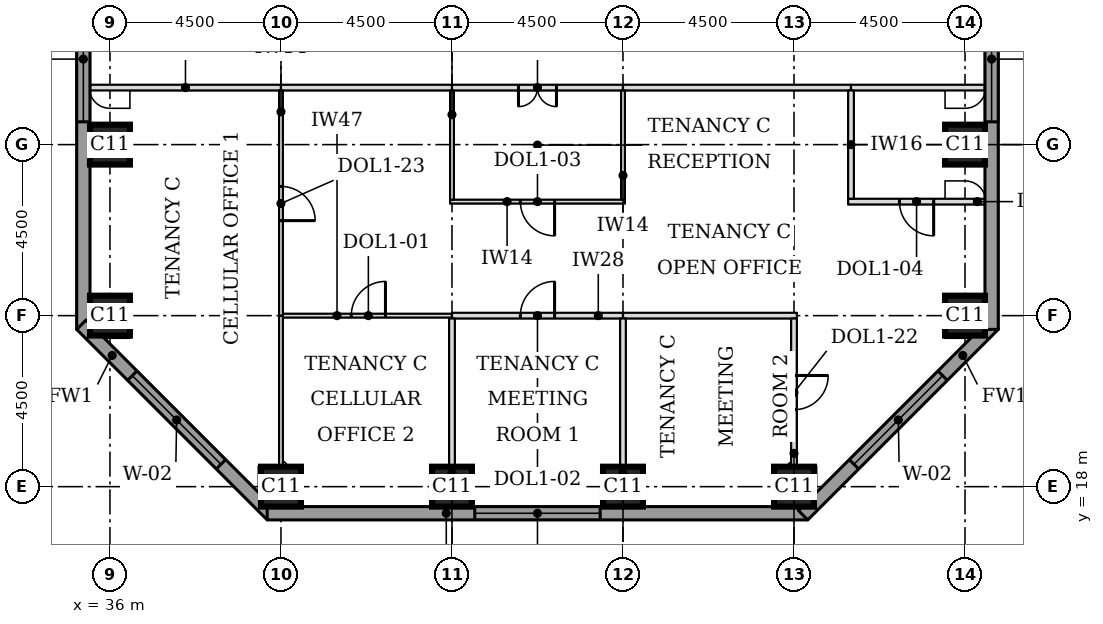
"""IFC4 building model, lengths in metres.
Left out: names, types, materials, properties, quantities, classifications, styles, units other than length and angle.
Written with IfcOpenShell. Run it as: python <this file> out.ifc"""

import sys

from ifc_helpers import new_model, si_unit, direction, frame, frame_2d, origin, origin_2d, place, context, subcontext, project, spatial, rectangle, extrude, element, fill, save


model = new_model("IFC4")
c1 = context("Model", 3, precision=1e-05, world=origin(), true_north=direction((0.0, 1.0)))
c2 = subcontext(c1, "Body", "Model", "MODEL_VIEW")
j1 = project(units=[si_unit("LENGTHUNIT", "METRE"), si_unit("PLANEANGLEUNIT", "RADIAN")], contexts=[c1])
p1 = place(None, origin())
s1 = spatial("IfcSite", under=j1, at=p1, CompositionType="ELEMENT")
p2 = place(p1, origin())
s2 = spatial("IfcBuilding", under=s1, at=p2, CompositionType="ELEMENT")
p3 = place(p2, frame((0.0, 0.0, 82.6)))
s3 = spatial("IfcBuildingStorey", under=s2, at=p3, CompositionType="ELEMENT", Elevation=82.6)
for number, where, z_axis, x_axis in (
    (1, (40.5, 18.0, 0.0), (0.0, 0.0, 1.0), (1.0, 0.0, 0.0)),
    (2, (45.0, 18.0, 0.0), (0.0, 0.0, 1.0), (1.0, 0.0, 0.0)),
    (3, (49.5, 18.0, 0.0), (0.0, 0.0, 1.0), (1.0, 0.0, 0.0)),
    (4, (54.0, 18.0, 0.0), (0.0, 0.0, 1.0), (1.0, 0.0, 0.0)),
    (5, (36.0, 22.5, 0.0), (0.0, 0.0, 1.0), (1.0, 0.0, 0.0)),
    (6, (58.5, 22.5, 0.0), (0.0, 0.0, 1.0), (1.0, 0.0, 0.0)),
    (7, (36.0, 27.0, 0.0), (0.0, 0.0, 1.0), (1.0, 0.0, 0.0)),
    (8, (58.5, 27.0, 0.0), (0.0, 0.0, 1.0), (1.0, 0.0, 0.0)),
):
    element("IfcColumn", number, at=place(p3, frame(where, z_axis=z_axis, x_axis=x_axis)), inside=s3, PredefinedType="COLUMN", context=c2, shape_type="SweptSolid", body=[
        extrude(rectangle(XDim=1.05, YDim=1.05, at=origin_2d()), origin(), (0.0, 0.0, 1.0), 3.7),
    ])
p4 = place(p3, frame((35.3, 39.975, 0.0), z_axis=(0.0, 0.0, 1.0), x_axis=(0.0, -1.0, 0.0)))
e9 = element("IfcWall", 9, at=p4, inside=s3, PredefinedType="STANDARD", context=c2, shape_type="SweptSolid", body=[
    extrude(rectangle(XDim=17.837, YDim=0.35, at=frame_2d((8.919, 0.0))), origin(), (0.0, 0.0, 1.0), 3.525),
])
p5 = place(p4, frame((0.5, 0.0, 0.9)))
e10 = element("IfcOpeningElement", 10, at=p5, cuts=e9, PredefinedType="OPENING", context=c2, shape_type="SweptSolid", body=[
    extrude(rectangle(XDim=3.3, YDim=1.9, at=frame_2d((1.65, 0.95))), frame((0.0, 0.185, 0.0), z_axis=(0.0, -1.0, 0.0), x_axis=(1.0, 0.0, 0.0)), (0.0, 0.0, 1.0), 0.37),
])
p6 = place(p4, frame((9.075, 0.0, 0.9)))
e11 = element("IfcOpeningElement", 11, at=p6, cuts=e9, PredefinedType="OPENING", context=c2, shape_type="SweptSolid", body=[
    extrude(rectangle(XDim=3.3, YDim=1.9, at=frame_2d((1.65, 0.95))), frame((0.0, 0.185, 0.0), z_axis=(0.0, -1.0, 0.0), x_axis=(1.0, 0.0, 0.0)), (0.0, 0.0, 1.0), 0.37),
])
p7 = place(p3, frame((35.249, 22.261, 0.0), z_axis=(0.0, 0.0, 1.0), x_axis=(0.707106781187, -0.707106781187, 0.0)))
e12 = element("IfcWall", 12, at=p7, inside=s3, PredefinedType="STANDARD", context=c2, shape_type="SweptSolid", body=[
    extrude(rectangle(XDim=7.089, YDim=0.35, at=frame_2d((3.544, 0.0))), origin(), (0.0, 0.0, 1.0), 3.525),
])
p8 = place(p7, frame((1.894, 0.0, 0.9)))
e13 = element("IfcOpeningElement", 13, at=p8, cuts=e12, PredefinedType="OPENING", context=c2, shape_type="SweptSolid", body=[
    extrude(rectangle(XDim=3.3, YDim=1.9, at=frame_2d((1.65, 0.95))), frame((0.0, 0.185, 0.0), z_axis=(0.0, -1.0, 0.0), x_axis=(1.0, 0.0, 0.0)), (0.0, 0.0, 1.0), 0.37),
])
p9 = place(p3, frame((40.138, 17.3, 0.0), z_axis=(0.0, 0.0, 1.0), x_axis=(1.0, 0.0, 0.0)))
e14 = element("IfcWall", 14, at=p9, inside=s3, PredefinedType="STANDARD", context=c2, shape_type="SweptSolid", body=[
    extrude(rectangle(XDim=14.225, YDim=0.35, at=frame_2d((7.112, 0.0))), origin(), (0.0, 0.0, 1.0), 3.525),
])
p10 = place(p9, frame((5.462, 0.0, 0.9)))
e15 = element("IfcOpeningElement", 15, at=p10, cuts=e14, PredefinedType="OPENING", context=c2, shape_type="SweptSolid", body=[
    extrude(rectangle(XDim=3.3, YDim=1.9, at=frame_2d((1.65, 0.95))), frame((0.0, 0.185, 0.0), z_axis=(0.0, -1.0, 0.0), x_axis=(1.0, 0.0, 0.0)), (0.0, 0.0, 1.0), 0.37),
])
p11 = place(p3, frame((54.239, 17.249, 0.0), z_axis=(0.0, 0.0, 1.0), x_axis=(0.707106781187, 0.707106781187, 0.0)))
e16 = element("IfcWall", 16, at=p11, inside=s3, PredefinedType="STANDARD", context=c2, shape_type="SweptSolid", body=[
    extrude(rectangle(XDim=7.089, YDim=0.35, at=frame_2d((3.544, 0.0))), origin(), (0.0, 0.0, 1.0), 3.525),
])
p12 = place(p11, frame((1.894, 0.0, 0.9)))
e17 = element("IfcOpeningElement", 17, at=p12, cuts=e16, PredefinedType="OPENING", context=c2, shape_type="SweptSolid", body=[
    extrude(rectangle(XDim=3.3, YDim=1.9, at=frame_2d((1.65, 0.95))), frame((0.0, 0.185, 0.0), z_axis=(0.0, -1.0, 0.0), x_axis=(1.0, 0.0, 0.0)), (0.0, 0.0, 1.0), 0.37),
])
p13 = place(p3, frame((59.2, 22.138, 0.0), z_axis=(0.0, 0.0, 1.0), x_axis=(0.0, 1.0, 0.0)))
e18 = element("IfcWall", 18, at=p13, inside=s3, PredefinedType="STANDARD", context=c2, shape_type="SweptSolid", body=[
    extrude(rectangle(XDim=17.837, YDim=0.35, at=frame_2d((8.919, 0.0))), origin(), (0.0, 0.0, 1.0), 3.525),
])
p14 = place(p13, frame((5.462, 0.0, 0.9)))
e19 = element("IfcOpeningElement", 19, at=p14, cuts=e18, PredefinedType="OPENING", context=c2, shape_type="SweptSolid", body=[
    extrude(rectangle(XDim=3.3, YDim=1.9, at=frame_2d((1.65, 0.95))), frame((0.0, 0.185, 0.0), z_axis=(0.0, -1.0, 0.0), x_axis=(1.0, 0.0, 0.0)), (0.0, 0.0, 1.0), 0.37),
])
p15 = place(p13, frame((14.037, 0.0, 0.9)))
e20 = element("IfcOpeningElement", 20, at=p15, cuts=e18, PredefinedType="OPENING", context=c2, shape_type="SweptSolid", body=[
    extrude(rectangle(XDim=3.3, YDim=1.9, at=frame_2d((1.65, 0.95))), frame((0.0, 0.185, 0.0), z_axis=(0.0, -1.0, 0.0), x_axis=(1.0, 0.0, 0.0)), (0.0, 0.0, 1.0), 0.37),
])
p16 = place(p3, frame((40.55, 22.5, 0.0), z_axis=(0.0, 0.0, 1.0), x_axis=(1.0, 0.0, 0.0)))
e21 = element("IfcWall", 21, at=p16, inside=s3, PredefinedType="PARTITIONING", context=c2, shape_type="SweptSolid", body=[
    extrude(rectangle(XDim=4.45, YDim=0.1, at=frame_2d((2.225, 0.0))), origin(), (0.0, 0.0, 1.0), 2.55),
])
p17 = place(p16, frame((1.8, 0.0, 0.0)))
e22 = element("IfcOpeningElement", 22, at=p17, cuts=e21, PredefinedType="OPENING", context=c2, shape_type="SweptSolid", body=[
    extrude(rectangle(XDim=0.9, YDim=2.1, at=frame_2d((0.45, 1.05))), frame((0.0, 0.06, 0.0), z_axis=(0.0, -1.0, 0.0), x_axis=(1.0, 0.0, 0.0)), (0.0, 0.0, 1.0), 0.12),
])
p18 = place(p3, frame((45.0, 22.5, 0.0), z_axis=(0.0, 0.0, 1.0), x_axis=(1.0, 0.0, 0.0)))
e23 = element("IfcWall", 23, at=p18, inside=s3, PredefinedType="PARTITIONING", context=c2, shape_type="SweptSolid", body=[
    extrude(rectangle(XDim=4.5, YDim=0.15, at=frame_2d((2.25, 0.0))), origin(), (0.0, 0.0, 1.0), 2.55),
])
p19 = place(p18, frame((1.8, 0.0, 0.0)))
e24 = element("IfcOpeningElement", 24, at=p19, cuts=e23, PredefinedType="OPENING", context=c2, shape_type="SweptSolid", body=[
    extrude(rectangle(XDim=0.9, YDim=2.1, at=frame_2d((0.45, 1.05))), frame((0.0, 0.085, 0.0), z_axis=(0.0, -1.0, 0.0), x_axis=(1.0, 0.0, 0.0)), (0.0, 0.0, 1.0), 0.17),
])
p20 = place(p3, frame((49.5, 22.5, 0.0), z_axis=(0.0, 0.0, 1.0), x_axis=(1.0, 0.0, 0.0)))
e25 = element("IfcWall", 25, at=p20, inside=s3, PredefinedType="PARTITIONING", context=c2, shape_type="SweptSolid", body=[
    extrude(rectangle(XDim=4.575, YDim=0.15, at=frame_2d((2.288, 0.0))), origin(), (0.0, 0.0, 1.0), 2.55),
])
p21 = place(p3, frame((44.95, 25.5, 0.0), z_axis=(0.0, 0.0, 1.0), x_axis=(1.0, 0.0, 0.0)))
e26 = element("IfcWall", 26, at=p21, inside=s3, PredefinedType="PARTITIONING", context=c2, shape_type="SweptSolid", body=[
    extrude(rectangle(XDim=4.6, YDim=0.1, at=frame_2d((2.3, 0.0))), origin(), (0.0, 0.0, 1.0), 3.55),
])
p22 = place(p21, frame((1.85, 0.0, 0.0)))
e27 = element("IfcOpeningElement", 27, at=p22, cuts=e26, PredefinedType="OPENING", context=c2, shape_type="SweptSolid", body=[
    extrude(rectangle(XDim=0.9, YDim=2.1, at=frame_2d((0.45, 1.05))), frame((0.0, 0.06, 0.0), z_axis=(0.0, -1.0, 0.0), x_axis=(1.0, 0.0, 0.0)), (0.0, 0.0, 1.0), 0.12),
])
p23 = place(p3, frame((55.425, 25.5, 0.0), z_axis=(0.0, 0.0, 1.0), x_axis=(1.0, 0.0, 0.0)))
e28 = element("IfcWall", 28, at=p23, inside=s3, PredefinedType="PARTITIONING", context=c2, shape_type="SweptSolid", body=[
    extrude(rectangle(XDim=3.6, YDim=0.15, at=frame_2d((1.8, 0.0))), origin(), (0.0, 0.0, 1.0), 3.55),
])
p24 = place(p23, frame((1.35, 0.0, 0.0)))
e29 = element("IfcOpeningElement", 29, at=p24, cuts=e28, PredefinedType="OPENING", context=c2, shape_type="SweptSolid", body=[
    extrude(rectangle(XDim=0.9, YDim=2.1, at=frame_2d((0.45, 1.05))), frame((0.0, 0.085, 0.0), z_axis=(0.0, -1.0, 0.0), x_axis=(1.0, 0.0, 0.0)), (0.0, 0.0, 1.0), 0.17),
])
p25 = place(p3, frame((35.475, 28.5, 0.0), z_axis=(0.0, 0.0, 1.0), x_axis=(1.0, 0.0, 0.0)))
e30 = element("IfcWall", 30, at=p25, inside=s3, PredefinedType="PARTITIONING", context=c2, shape_type="SweptSolid", body=[
    extrude(rectangle(XDim=5.025, YDim=0.15, at=frame_2d((2.512, 0.0))), origin(), (0.0, 0.0, 1.0), 3.55),
])
p26 = place(p3, frame((40.5, 28.5, 0.0), z_axis=(0.0, 0.0, 1.0), x_axis=(1.0, 0.0, 0.0)))
e31 = element("IfcWall", 31, at=p26, inside=s3, PredefinedType="PARTITIONING", context=c2, shape_type="SweptSolid", body=[
    extrude(rectangle(XDim=4.5, YDim=0.15, at=frame_2d((2.25, 0.0))), origin(), (0.0, 0.0, 1.0), 3.55),
])
p27 = place(p3, frame((45.0, 28.5, 0.0), z_axis=(0.0, 0.0, 1.0), x_axis=(1.0, 0.0, 0.0)))
e32 = element("IfcWall", 32, at=p27, inside=s3, PredefinedType="PARTITIONING", context=c2, shape_type="SweptSolid", body=[
    extrude(rectangle(XDim=4.5, YDim=0.15, at=frame_2d((2.25, 0.0))), origin(), (0.0, 0.0, 1.0), 3.55),
])
p28 = place(p27, frame((1.75, 0.0, 0.0)))
e33 = element("IfcOpeningElement", 33, at=p28, cuts=e32, PredefinedType="OPENING", context=c2, shape_type="SweptSolid", body=[
    extrude(rectangle(XDim=1.0, YDim=2.1, at=frame_2d((0.5, 1.05))), frame((0.0, 0.085, 0.0), z_axis=(0.0, -1.0, 0.0), x_axis=(1.0, 0.0, 0.0)), (0.0, 0.0, 1.0), 0.17),
])
p29 = place(p3, frame((49.5, 28.5, 0.0), z_axis=(0.0, 0.0, 1.0), x_axis=(1.0, 0.0, 0.0)))
e34 = element("IfcWall", 34, at=p29, inside=s3, PredefinedType="PARTITIONING", context=c2, shape_type="SweptSolid", body=[
    extrude(rectangle(XDim=6.0, YDim=0.15, at=frame_2d((3.0, 0.0))), origin(), (0.0, 0.0, 1.0), 3.55),
])
p30 = place(p3, frame((55.5, 28.5, 0.0), z_axis=(0.0, 0.0, 1.0), x_axis=(1.0, 0.0, 0.0)))
e35 = element("IfcWall", 35, at=p30, inside=s3, PredefinedType="PARTITIONING", context=c2, shape_type="SweptSolid", body=[
    extrude(rectangle(XDim=3.525, YDim=0.15, at=frame_2d((1.762, 0.0))), origin(), (0.0, 0.0, 1.0), 3.55),
])
for number, where, z_axis, x_axis in (
    (36, (45.0, 17.475, 0.0), (0.0, 0.0, 1.0), (0.0, 1.0, 0.0)),
    (37, (49.5, 17.475, 0.0), (0.0, 0.0, 1.0), (0.0, 1.0, 0.0)),
):
    element("IfcWall", number, at=place(p3, frame(where, z_axis=z_axis, x_axis=x_axis)), inside=s3, PredefinedType="PARTITIONING", context=c2, shape_type="SweptSolid", body=[
        extrude(rectangle(XDim=4.95, YDim=0.15, at=frame_2d((2.475, 0.0))), origin(), (0.0, 0.0, 1.0), 3.55),
    ])
p31 = place(p3, frame((40.5, 18.525, 0.0), z_axis=(0.0, 0.0, 1.0), x_axis=(0.0, 1.0, 0.0)))
e38 = element("IfcWall", 38, at=p31, inside=s3, PredefinedType="PARTITIONING", context=c2, shape_type="SweptSolid", body=[
    extrude(rectangle(XDim=3.975, YDim=0.1, at=frame_2d((1.988, 0.0))), origin(), (0.0, 0.0, 1.0), 3.55),
])
p32 = place(p3, frame((54.0, 18.525, 0.0), z_axis=(0.0, 0.0, 1.0), x_axis=(0.0, 1.0, 0.0)))
e39 = element("IfcWall", 39, at=p32, inside=s3, PredefinedType="PARTITIONING", context=c2, shape_type="SweptSolid", body=[
    extrude(rectangle(XDim=3.9, YDim=0.15, at=frame_2d((1.95, 0.0))), origin(), (0.0, 0.0, 1.0), 3.55),
])
p33 = place(p32, frame((1.5, 0.0, 0.0)))
e40 = element("IfcOpeningElement", 40, at=p33, cuts=e39, PredefinedType="OPENING", context=c2, shape_type="SweptSolid", body=[
    extrude(rectangle(XDim=0.9, YDim=2.1, at=frame_2d((0.45, 1.05))), frame((0.0, 0.085, 0.0), z_axis=(0.0, -1.0, 0.0), x_axis=(1.0, 0.0, 0.0)), (0.0, 0.0, 1.0), 0.17),
])
p34 = place(p3, frame((40.5, 22.5, 0.0), z_axis=(0.0, 0.0, 1.0), x_axis=(0.0, 1.0, 0.0)))
e41 = element("IfcWall", 41, at=p34, inside=s3, PredefinedType="PARTITIONING", context=c2, shape_type="SweptSolid", body=[
    extrude(rectangle(XDim=5.925, YDim=0.1, at=frame_2d((2.962, 0.0))), origin(), (0.0, 0.0, 1.0), 3.55),
])
p35 = place(p34, frame((2.5, 0.0, 0.0)))
e42 = element("IfcOpeningElement", 42, at=p35, cuts=e41, PredefinedType="OPENING", context=c2, shape_type="SweptSolid", body=[
    extrude(rectangle(XDim=0.9, YDim=2.1, at=frame_2d((0.45, 1.05))), frame((0.0, 0.06, 0.0), z_axis=(0.0, -1.0, 0.0), x_axis=(1.0, 0.0, 0.0)), (0.0, 0.0, 1.0), 0.12),
])
for number, where, z_axis, x_axis in (
    (43, (45.0, 25.55, 0.0), (0.0, 0.0, 1.0), (0.0, 1.0, 0.0)),
    (44, (49.5, 25.55, 0.0), (0.0, 0.0, 1.0), (0.0, 1.0, 0.0)),
):
    element("IfcWall", number, at=place(p3, frame(where, z_axis=z_axis, x_axis=x_axis)), inside=s3, PredefinedType="PARTITIONING", context=c2, shape_type="SweptSolid", body=[
        extrude(rectangle(XDim=2.875, YDim=0.1, at=frame_2d((1.438, 0.0))), origin(), (0.0, 0.0, 1.0), 3.55),
    ])
p36 = place(p3, frame((55.5, 25.575, 0.0), z_axis=(0.0, 0.0, 1.0), x_axis=(0.0, 1.0, 0.0)))
e45 = element("IfcWall", 45, at=p36, inside=s3, PredefinedType="PARTITIONING", context=c2, shape_type="SweptSolid", body=[
    extrude(rectangle(XDim=2.85, YDim=0.15, at=frame_2d((1.425, 0.0))), origin(), (0.0, 0.0, 1.0), 3.55),
])
p37 = place(p6, origin())
e46 = element("IfcWindow", 46, at=p37, inside=s3, PartitioningType="SINGLE_PANEL", PredefinedType="WINDOW", context=c2, shape_type="SweptSolid", body=[
    extrude(rectangle(XDim=3.3, YDim=1.9, at=frame_2d((1.65, 0.95))), frame((0.0, 0.085, 0.0), z_axis=(0.0, -1.0, 0.0), x_axis=(1.0, 0.0, 0.0)), (0.0, 0.0, 1.0), 0.06),
])
fill(e11, e46)
p38 = place(p8, origin())
e47 = element("IfcWindow", 47, at=p38, inside=s3, PartitioningType="SINGLE_PANEL", PredefinedType="WINDOW", context=c2, shape_type="SweptSolid", body=[
    extrude(rectangle(XDim=3.3, YDim=1.9, at=frame_2d((1.65, 0.95))), frame((0.0, 0.085, 0.0), z_axis=(0.0, -1.0, 0.0), x_axis=(1.0, 0.0, 0.0)), (0.0, 0.0, 1.0), 0.06),
])
fill(e13, e47)
p39 = place(p10, origin())
e48 = element("IfcWindow", 48, at=p39, inside=s3, PartitioningType="SINGLE_PANEL", PredefinedType="WINDOW", context=c2, shape_type="SweptSolid", body=[
    extrude(rectangle(XDim=3.3, YDim=1.9, at=frame_2d((1.65, 0.95))), frame((0.0, 0.085, 0.0), z_axis=(0.0, -1.0, 0.0), x_axis=(1.0, 0.0, 0.0)), (0.0, 0.0, 1.0), 0.06),
])
fill(e15, e48)
p40 = place(p12, origin())
e49 = element("IfcWindow", 49, at=p40, inside=s3, PartitioningType="SINGLE_PANEL", PredefinedType="WINDOW", context=c2, shape_type="SweptSolid", body=[
    extrude(rectangle(XDim=3.3, YDim=1.9, at=frame_2d((1.65, 0.95))), frame((0.0, 0.085, 0.0), z_axis=(0.0, -1.0, 0.0), x_axis=(1.0, 0.0, 0.0)), (0.0, 0.0, 1.0), 0.06),
])
fill(e17, e49)
p41 = place(p14, origin())
e50 = element("IfcWindow", 50, at=p41, inside=s3, PartitioningType="SINGLE_PANEL", PredefinedType="WINDOW", context=c2, shape_type="SweptSolid", body=[
    extrude(rectangle(XDim=3.3, YDim=1.9, at=frame_2d((1.65, 0.95))), frame((0.0, 0.085, 0.0), z_axis=(0.0, -1.0, 0.0), x_axis=(1.0, 0.0, 0.0)), (0.0, 0.0, 1.0), 0.06),
])
fill(e19, e50)
p42 = place(p28, frame((1.0, 0.0, 0.0), z_axis=(0.0, 0.0, 1.0), x_axis=(-1.0, 0.0, 0.0)))
e51 = element("IfcDoor", 51, at=p42, inside=s3, OperationType="DOUBLE_DOOR_SINGLE_SWING", PredefinedType="DOOR", context=c2, shape_type="SweptSolid", body=[
    extrude(rectangle(XDim=1.0, YDim=2.1, at=frame_2d((0.5, 1.05))), frame((0.0, 0.025, 0.0), z_axis=(0.0, -1.0, 0.0), x_axis=(1.0, 0.0, 0.0)), (0.0, 0.0, 1.0), 0.05),
])
fill(e33, e51)
p43 = place(p22, frame((0.9, 0.0, 0.0), z_axis=(0.0, 0.0, 1.0), x_axis=(-1.0, 0.0, 0.0)))
e52 = element("IfcDoor", 52, at=p43, inside=s3, OperationType="SINGLE_SWING_LEFT", PredefinedType="DOOR", context=c2, shape_type="SweptSolid", body=[
    extrude(rectangle(XDim=0.9, YDim=2.1, at=frame_2d((0.45, 1.05))), frame((0.0, 0.025, 0.0), z_axis=(0.0, -1.0, 0.0), x_axis=(1.0, 0.0, 0.0)), (0.0, 0.0, 1.0), 0.05),
])
fill(e27, e52)
p44 = place(p35, frame((0.9, 0.0, 0.0), z_axis=(0.0, 0.0, 1.0), x_axis=(-1.0, 0.0, 0.0)))
e53 = element("IfcDoor", 53, at=p44, inside=s3, OperationType="SINGLE_SWING_RIGHT", PredefinedType="DOOR", context=c2, shape_type="SweptSolid", body=[
    extrude(rectangle(XDim=0.9, YDim=2.1, at=frame_2d((0.45, 1.05))), frame((0.0, 0.025, 0.0), z_axis=(0.0, -1.0, 0.0), x_axis=(1.0, 0.0, 0.0)), (0.0, 0.0, 1.0), 0.05),
])
fill(e42, e53)
p45 = place(p17, origin())
e54 = element("IfcDoor", 54, at=p45, inside=s3, OperationType="SINGLE_SWING_RIGHT", PredefinedType="DOOR", context=c2, shape_type="SweptSolid", body=[
    extrude(rectangle(XDim=0.9, YDim=2.1, at=frame_2d((0.45, 1.05))), frame((0.0, 0.025, 0.0), z_axis=(0.0, -1.0, 0.0), x_axis=(1.0, 0.0, 0.0)), (0.0, 0.0, 1.0), 0.05),
])
fill(e22, e54)
p46 = place(p24, frame((0.9, 0.0, 0.0), z_axis=(0.0, 0.0, 1.0), x_axis=(-1.0, 0.0, 0.0)))
e55 = element("IfcDoor", 55, at=p46, inside=s3, OperationType="SINGLE_SWING_LEFT", PredefinedType="DOOR", context=c2, shape_type="SweptSolid", body=[
    extrude(rectangle(XDim=0.9, YDim=2.1, at=frame_2d((0.45, 1.05))), frame((0.0, 0.025, 0.0), z_axis=(0.0, -1.0, 0.0), x_axis=(1.0, 0.0, 0.0)), (0.0, 0.0, 1.0), 0.05),
])
fill(e29, e55)
p47 = place(p19, origin())
e56 = element("IfcDoor", 56, at=p47, inside=s3, OperationType="SINGLE_SWING_RIGHT", PredefinedType="DOOR", context=c2, shape_type="SweptSolid", body=[
    extrude(rectangle(XDim=0.9, YDim=2.1, at=frame_2d((0.45, 1.05))), frame((0.0, 0.025, 0.0), z_axis=(0.0, -1.0, 0.0), x_axis=(1.0, 0.0, 0.0)), (0.0, 0.0, 1.0), 0.05),
])
fill(e24, e56)
p48 = place(p33, frame((0.9, 0.0, 0.0), z_axis=(0.0, 0.0, 1.0), x_axis=(-1.0, 0.0, 0.0)))
e57 = element("IfcDoor", 57, at=p48, inside=s3, OperationType="SINGLE_SWING_LEFT", PredefinedType="DOOR", context=c2, shape_type="SweptSolid", body=[
    extrude(rectangle(XDim=0.9, YDim=2.1, at=frame_2d((0.45, 1.05))), frame((0.0, 0.025, 0.0), z_axis=(0.0, -1.0, 0.0), x_axis=(1.0, 0.0, 0.0)), (0.0, 0.0, 1.0), 0.05),
])
fill(e40, e57)
save(model, sys.argv[1])
